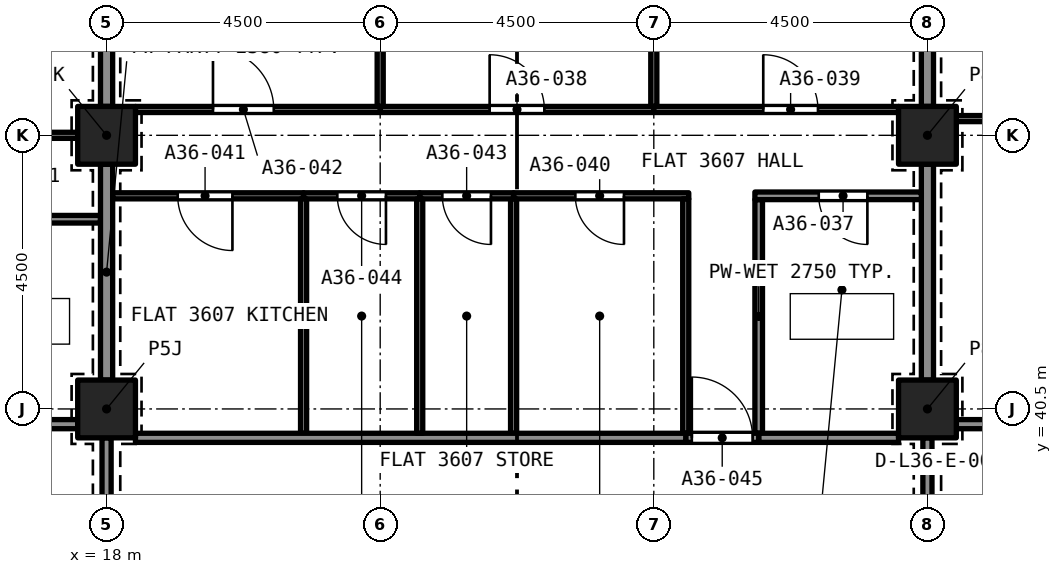
"""IFC4 building model, lengths in metres.
Left out: names, types, materials, properties, quantities, classifications, styles, units other than length and angle.
Written with IfcOpenShell. Run it as: python <this file> out.ifc"""

import sys

from ifc_helpers import new_model, si_unit, direction, frame, frame_2d, origin, origin_2d, place, context, subcontext, project, spatial, rectangle, extrude, element, fill, save


model = new_model("IFC4")
c1 = context("Model", 3, precision=1e-05, world=origin(), true_north=direction((0.0, 1.0)))
c2 = subcontext(c1, "Body", "Model", "MODEL_VIEW")
j1 = project(units=[si_unit("LENGTHUNIT", "METRE"), si_unit("PLANEANGLEUNIT", "RADIAN")], contexts=[c1])
p1 = place(None, origin())
s1 = spatial("IfcSite", under=j1, at=p1, CompositionType="ELEMENT")
p2 = place(p1, origin())
s2 = spatial("IfcBuilding", under=s1, at=p2, CompositionType="ELEMENT")
p3 = place(p2, frame((0.0, 0.0, 130.2)))
s3 = spatial("IfcBuildingStorey", under=s2, at=p3, CompositionType="ELEMENT", Elevation=130.2)
for number, where, z_axis, x_axis in (
    (1, (18.0, 40.5, 0.0), (0.0, 0.0, 1.0), (1.0, 0.0, 0.0)),
    (2, (31.5, 40.5, 0.0), (0.0, 0.0, 1.0), (1.0, 0.0, 0.0)),
    (3, (18.0, 45.0, 0.0), (0.0, 0.0, 1.0), (1.0, 0.0, 0.0)),
    (4, (31.5, 45.0, 0.0), (0.0, 0.0, 1.0), (1.0, 0.0, 0.0)),
):
    element("IfcColumn", number, at=place(p3, frame(where, z_axis=z_axis, x_axis=x_axis)), inside=s3, PredefinedType="COLUMN", context=c2, shape_type="SweptSolid", body=[
        extrude(rectangle(XDim=0.95, YDim=0.95, at=origin_2d()), origin(), (0.0, 0.0, 1.0), 3.2),
    ])
p4 = place(p3, frame((17.9, 43.62, 0.0), z_axis=(0.0, 0.0, 1.0), x_axis=(-1.0, 0.0, 0.0)))
e5 = element("IfcWall", 5, at=p4, inside=s3, PredefinedType="PARTITIONING", context=c2, shape_type="SweptSolid", body=[
    extrude(rectangle(XDim=2.781, YDim=0.125, at=frame_2d((1.39, 0.0))), origin(), (0.0, 0.0, 1.0), 2.9),
])
p5 = place(p4, frame((0.94, 0.0, 0.0)))
e6 = element("IfcOpeningElement", 6, at=p5, cuts=e5, PredefinedType="OPENING", context=c2, shape_type="SweptSolid", body=[
    extrude(rectangle(XDim=0.8, YDim=2.1, at=frame_2d((0.4, 1.05))), frame((0.0, 0.073, 0.0), z_axis=(0.0, -1.0, 0.0), x_axis=(1.0, 0.0, 0.0)), (0.0, 0.0, 1.0), 0.145),
])
p6 = place(p3, frame((18.0, 40.975, 0.0), z_axis=(0.0, 0.0, 1.0), x_axis=(0.0, 1.0, 0.0)))
e7 = element("IfcWall", 7, at=p6, inside=s3, PredefinedType="PARTITIONING", context=c2, shape_type="SweptSolid", body=[
    extrude(rectangle(XDim=3.55, YDim=0.2, at=frame_2d((1.775, 0.0))), origin(), (0.0, 0.0, 1.0), 2.38),
])
p7 = place(p3, frame((13.5, 45.0, 0.0), z_axis=(0.0, 0.0, 1.0), x_axis=(1.0, 0.0, 0.0)))
e8 = element("IfcWall", 8, at=p7, inside=s3, PredefinedType="PARTITIONING", context=c2, shape_type="SweptSolid", body=[
    extrude(rectangle(XDim=4.025, YDim=0.1, at=frame_2d((2.012, 0.0))), origin(), (0.0, 0.0, 1.0), 2.9),
])
p8 = place(p7, frame((1.8, 0.0, 0.0)))
e9 = element("IfcOpeningElement", 9, at=p8, cuts=e8, PredefinedType="OPENING", context=c2, shape_type="SweptSolid", body=[
    extrude(rectangle(XDim=0.9, YDim=2.1, at=frame_2d((0.45, 1.05))), frame((0.0, 0.06, 0.0), z_axis=(0.0, -1.0, 0.0), x_axis=(1.0, 0.0, 0.0)), (0.0, 0.0, 1.0), 0.12),
])
p9 = place(p3, frame((18.0, 45.475, 0.0), z_axis=(0.0, 0.0, 1.0), x_axis=(0.0, 1.0, 0.0)))
e10 = element("IfcWall", 10, at=p9, inside=s3, PredefinedType="PARTITIONING", context=c2, shape_type="SweptSolid", body=[
    extrude(rectangle(XDim=3.55, YDim=0.2, at=frame_2d((1.775, 0.0))), origin(), (0.0, 0.0, 1.0), 2.38),
])
p10 = place(p3, frame((13.25, 40.25, 0.0), z_axis=(0.0, 0.0, 1.0), x_axis=(1.0, 0.0, 0.0)))
e11 = element("IfcWall", 11, at=p10, inside=s3, PredefinedType="PARTITIONING", context=c2, shape_type="SweptSolid", body=[
    extrude(rectangle(XDim=4.275, YDim=0.15, at=frame_2d((2.137, 0.0))), origin(), (0.0, 0.0, 1.0), 2.9),
])
p11 = place(p3, frame((31.975, 45.275, 0.0), z_axis=(0.0, 0.0, 1.0), x_axis=(1.0, 0.0, 0.0)))
e12 = element("IfcWall", 12, at=p11, inside=s3, PredefinedType="PARTITIONING", context=c2, shape_type="SweptSolid", body=[
    extrude(rectangle(XDim=4.025, YDim=0.1, at=frame_2d((2.012, 0.0))), origin(), (0.0, 0.0, 1.0), 2.9),
])
p12 = place(p11, frame((1.275, 0.0, 0.0)))
e13 = element("IfcOpeningElement", 13, at=p12, cuts=e12, PredefinedType="OPENING", context=c2, shape_type="SweptSolid", body=[
    extrude(rectangle(XDim=1.0, YDim=2.1, at=frame_2d((0.5, 1.05))), frame((0.0, 0.06, 0.0), z_axis=(0.0, -1.0, 0.0), x_axis=(1.0, 0.0, 0.0)), (0.0, 0.0, 1.0), 0.12),
])
p13 = place(p3, frame((31.5, 40.975, 0.0), z_axis=(0.0, 0.0, 1.0), x_axis=(0.0, 1.0, 0.0)))
e14 = element("IfcWall", 14, at=p13, inside=s3, PredefinedType="PARTITIONING", context=c2, shape_type="SweptSolid", body=[
    extrude(rectangle(XDim=3.55, YDim=0.2, at=frame_2d((1.775, 0.0))), origin(), (0.0, 0.0, 1.0), 2.38),
])
p14 = place(p3, frame((31.975, 40.25, 0.0), z_axis=(0.0, 0.0, 1.0), x_axis=(1.0, 0.0, 0.0)))
e15 = element("IfcWall", 15, at=p14, inside=s3, PredefinedType="PARTITIONING", context=c2, shape_type="SweptSolid", body=[
    extrude(rectangle(XDim=2.375, YDim=0.15, at=frame_2d((1.188, 0.0))), origin(), (0.0, 0.0, 1.0), 2.9),
])
p15 = place(p14, frame((1.245, 0.0, 0.0)))
e16 = element("IfcOpeningElement", 16, at=p15, cuts=e15, PredefinedType="OPENING", context=c2, shape_type="SweptSolid", body=[
    extrude(rectangle(XDim=1.0, YDim=2.1, at=frame_2d((0.5, 1.05))), frame((0.0, 0.085, 0.0), z_axis=(0.0, -1.0, 0.0), x_axis=(1.0, 0.0, 0.0)), (0.0, 0.0, 1.0), 0.17),
])
p16 = place(p3, frame((31.5, 45.475, 0.0), z_axis=(0.0, 0.0, 1.0), x_axis=(0.0, 1.0, 0.0)))
e17 = element("IfcWall", 17, at=p16, inside=s3, PredefinedType="PARTITIONING", context=c2, shape_type="SweptSolid", body=[
    extrude(rectangle(XDim=3.55, YDim=0.2, at=frame_2d((1.775, 0.0))), origin(), (0.0, 0.0, 1.0), 2.38),
])
p17 = place(p3, frame((28.725, 40.1, 0.0), z_axis=(0.0, 0.0, 1.0), x_axis=(0.0, 1.0, 0.0)))
e18 = element("IfcWall", 18, at=p17, inside=s3, PredefinedType="PARTITIONING", context=c2, shape_type="SweptSolid", body=[
    extrude(rectangle(XDim=3.842, YDim=0.125, at=frame_2d((1.921, 0.0))), origin(), (0.0, 0.0, 1.0), 2.75),
])
p18 = place(p3, frame((31.4, 44.005, 0.0), z_axis=(0.0, 0.0, 1.0), x_axis=(-1.0, 0.0, 0.0)))
e19 = element("IfcWall", 19, at=p18, inside=s3, PredefinedType="PARTITIONING", context=c2, shape_type="SweptSolid", body=[
    extrude(rectangle(XDim=2.737, YDim=0.125, at=frame_2d((1.369, 0.0))), origin(), (0.0, 0.0, 1.0), 2.75),
])
p19 = place(p18, frame((0.887, 0.0, 0.0)))
e20 = element("IfcOpeningElement", 20, at=p19, cuts=e19, PredefinedType="OPENING", context=c2, shape_type="SweptSolid", body=[
    extrude(rectangle(XDim=0.8, YDim=2.1, at=frame_2d((0.4, 1.05))), frame((0.0, 0.073, 0.0), z_axis=(0.0, -1.0, 0.0), x_axis=(1.0, 0.0, 0.0)), (0.0, 0.0, 1.0), 0.145),
])
p20 = place(p3, frame((28.725, 40.025, 0.0), z_axis=(0.0, 0.0, 1.0), x_axis=(1.0, 0.0, 0.0)))
e21 = element("IfcWall", 21, at=p20, inside=s3, PredefinedType="PARTITIONING", context=c2, shape_type="SweptSolid", body=[
    extrude(rectangle(XDim=2.3, YDim=0.15, at=frame_2d((1.15, 0.0))), origin(), (0.0, 0.0, 1.0), 2.75),
])
p21 = place(p3, frame((27.0, 45.475, 0.0), z_axis=(0.0, 0.0, 1.0), x_axis=(0.0, 1.0, 0.0)))
e22 = element("IfcWall", 22, at=p21, inside=s3, PredefinedType="PARTITIONING", context=c2, shape_type="SweptSolid", body=[
    extrude(rectangle(XDim=3.55, YDim=0.1, at=frame_2d((1.775, 0.0))), origin(), (0.0, 0.0, 1.0), 2.75),
])
p22 = place(p3, frame((22.5, 45.425, 0.0), z_axis=(0.0, 0.0, 1.0), x_axis=(1.0, 0.0, 0.0)))
e23 = element("IfcWall", 23, at=p22, inside=s3, PredefinedType="PARTITIONING", context=c2, shape_type="SweptSolid", body=[
    extrude(rectangle(XDim=4.5, YDim=0.1, at=frame_2d((2.25, 0.0))), origin(), (0.0, 0.0, 1.0), 2.75),
])
p23 = place(p22, frame((1.8, 0.0, 0.0)))
e24 = element("IfcOpeningElement", 24, at=p23, cuts=e23, PredefinedType="OPENING", context=c2, shape_type="SweptSolid", body=[
    extrude(rectangle(XDim=0.9, YDim=2.1, at=frame_2d((0.45, 1.05))), frame((0.0, 0.06, 0.0), z_axis=(0.0, -1.0, 0.0), x_axis=(1.0, 0.0, 0.0)), (0.0, 0.0, 1.0), 0.12),
])
p24 = place(p3, frame((22.5, 45.475, 0.0), z_axis=(0.0, 0.0, 1.0), x_axis=(0.0, 1.0, 0.0)))
e25 = element("IfcWall", 25, at=p24, inside=s3, PredefinedType="PARTITIONING", context=c2, shape_type="SweptSolid", body=[
    extrude(rectangle(XDim=3.55, YDim=0.1, at=frame_2d((1.775, 0.0))), origin(), (0.0, 0.0, 1.0), 2.75),
])
p25 = place(p3, frame((27.0, 45.425, 0.0), z_axis=(0.0, 0.0, 1.0), x_axis=(1.0, 0.0, 0.0)))
e26 = element("IfcWall", 26, at=p25, inside=s3, PredefinedType="PARTITIONING", context=c2, shape_type="SweptSolid", body=[
    extrude(rectangle(XDim=4.025, YDim=0.1, at=frame_2d((2.012, 0.0))), origin(), (0.0, 0.0, 1.0), 2.75),
])
p26 = place(p25, frame((1.8, 0.0, 0.0)))
e27 = element("IfcOpeningElement", 27, at=p26, cuts=e26, PredefinedType="OPENING", context=c2, shape_type="SweptSolid", body=[
    extrude(rectangle(XDim=0.9, YDim=2.1, at=frame_2d((0.45, 1.05))), frame((0.0, 0.06, 0.0), z_axis=(0.0, -1.0, 0.0), x_axis=(1.0, 0.0, 0.0)), (0.0, 0.0, 1.0), 0.12),
])
p27 = place(p3, frame((27.575, 44.005, 0.0), z_axis=(0.0, 0.0, 1.0), x_axis=(-1.0, 0.0, 0.0)))
e28 = element("IfcWall", 28, at=p27, inside=s3, PredefinedType="PARTITIONING", context=c2, shape_type="SweptSolid", body=[
    extrude(rectangle(XDim=2.881, YDim=0.1, at=frame_2d((1.44, 0.0))), origin(), (0.0, 0.0, 1.0), 2.75),
])
p28 = place(p27, frame((1.066, 0.0, 0.0)))
e29 = element("IfcOpeningElement", 29, at=p28, cuts=e28, PredefinedType="OPENING", context=c2, shape_type="SweptSolid", body=[
    extrude(rectangle(XDim=0.8, YDim=2.1, at=frame_2d((0.4, 1.05))), frame((0.0, 0.06, 0.0), z_axis=(0.0, -1.0, 0.0), x_axis=(1.0, 0.0, 0.0)), (0.0, 0.0, 1.0), 0.12),
])
for number, where, z_axis, x_axis in (
    (30, (27.525, 40.1, 0.0), (0.0, 0.0, 1.0), (0.0, 1.0, 0.0)),
    (31, (24.694, 40.1, 0.0), (0.0, 0.0, 1.0), (0.0, 1.0, 0.0)),
):
    element("IfcWall", number, at=place(p3, frame(where, z_axis=z_axis, x_axis=x_axis)), inside=s3, PredefinedType="PARTITIONING", context=c2, shape_type="SweptSolid", body=[
        extrude(rectangle(XDim=3.855, YDim=0.1, at=frame_2d((1.927, 0.0))), origin(), (0.0, 0.0, 1.0), 2.75),
    ])
p29 = place(p3, frame((21.24, 44.005, 0.0), z_axis=(0.0, 0.0, 1.0), x_axis=(-1.0, 0.0, 0.0)))
e32 = element("IfcWall", 32, at=p29, inside=s3, PredefinedType="PARTITIONING", context=c2, shape_type="SweptSolid", body=[
    extrude(rectangle(XDim=3.14, YDim=0.1, at=frame_2d((1.57, 0.0))), origin(), (0.0, 0.0, 1.0), 2.75),
])
p30 = place(p29, frame((1.17, 0.0, 0.0)))
e33 = element("IfcOpeningElement", 33, at=p30, cuts=e32, PredefinedType="OPENING", context=c2, shape_type="SweptSolid", body=[
    extrude(rectangle(XDim=0.9, YDim=2.1, at=frame_2d((0.45, 1.05))), frame((0.0, 0.06, 0.0), z_axis=(0.0, -1.0, 0.0), x_axis=(1.0, 0.0, 0.0)), (0.0, 0.0, 1.0), 0.12),
])
p31 = place(p3, frame((18.475, 45.425, 0.0), z_axis=(0.0, 0.0, 1.0), x_axis=(1.0, 0.0, 0.0)))
e34 = element("IfcWall", 34, at=p31, inside=s3, PredefinedType="PARTITIONING", context=c2, shape_type="SweptSolid", body=[
    extrude(rectangle(XDim=4.025, YDim=0.1, at=frame_2d((2.012, 0.0))), origin(), (0.0, 0.0, 1.0), 2.75),
])
p32 = place(p31, frame((1.275, 0.0, 0.0)))
e35 = element("IfcOpeningElement", 35, at=p32, cuts=e34, PredefinedType="OPENING", context=c2, shape_type="SweptSolid", body=[
    extrude(rectangle(XDim=1.0, YDim=2.1, at=frame_2d((0.5, 1.05))), frame((0.0, 0.06, 0.0), z_axis=(0.0, -1.0, 0.0), x_axis=(1.0, 0.0, 0.0)), (0.0, 0.0, 1.0), 0.12),
])
p33 = place(p3, frame((24.694, 44.005, 0.0), z_axis=(0.0, 0.0, 1.0), x_axis=(-1.0, 0.0, 0.0)))
e36 = element("IfcWall", 36, at=p33, inside=s3, PredefinedType="PARTITIONING", context=c2, shape_type="SweptSolid", body=[
    extrude(rectangle(XDim=1.544, YDim=0.1, at=frame_2d((0.772, 0.0))), origin(), (0.0, 0.0, 1.0), 2.75),
])
p34 = place(p33, frame((0.372, 0.0, 0.0)))
e37 = element("IfcOpeningElement", 37, at=p34, cuts=e36, PredefinedType="OPENING", context=c2, shape_type="SweptSolid", body=[
    extrude(rectangle(XDim=0.8, YDim=2.1, at=frame_2d((0.4, 1.05))), frame((0.0, 0.06, 0.0), z_axis=(0.0, -1.0, 0.0), x_axis=(1.0, 0.0, 0.0)), (0.0, 0.0, 1.0), 0.12),
])
p35 = place(p3, frame((23.15, 44.005, 0.0), z_axis=(0.0, 0.0, 1.0), x_axis=(-1.0, 0.0, 0.0)))
e38 = element("IfcWall", 38, at=p35, inside=s3, PredefinedType="PARTITIONING", context=c2, shape_type="SweptSolid", body=[
    extrude(rectangle(XDim=1.91, YDim=0.1, at=frame_2d((0.955, 0.0))), origin(), (0.0, 0.0, 1.0), 2.75),
])
p36 = place(p35, frame((0.555, 0.0, 0.0)))
e39 = element("IfcOpeningElement", 39, at=p36, cuts=e38, PredefinedType="OPENING", context=c2, shape_type="SweptSolid", body=[
    extrude(rectangle(XDim=0.8, YDim=2.1, at=frame_2d((0.4, 1.05))), frame((0.0, 0.06, 0.0), z_axis=(0.0, -1.0, 0.0), x_axis=(1.0, 0.0, 0.0)), (0.0, 0.0, 1.0), 0.12),
])
p37 = place(p3, frame((27.525, 40.025, 0.0), z_axis=(0.0, 0.0, 1.0), x_axis=(1.0, 0.0, 0.0)))
e40 = element("IfcWall", 40, at=p37, inside=s3, PredefinedType="PARTITIONING", context=c2, shape_type="SweptSolid", body=[
    extrude(rectangle(XDim=1.2, YDim=0.15, at=frame_2d((0.6, 0.0))), origin(), (0.0, 0.0, 1.0), 2.75),
])
p38 = place(p37, frame((0.1, 0.0, 0.0)))
e41 = element("IfcOpeningElement", 41, at=p38, cuts=e40, PredefinedType="OPENING", context=c2, shape_type="SweptSolid", body=[
    extrude(rectangle(XDim=1.0, YDim=2.1, at=frame_2d((0.5, 1.05))), frame((0.0, 0.085, 0.0), z_axis=(0.0, -1.0, 0.0), x_axis=(1.0, 0.0, 0.0)), (0.0, 0.0, 1.0), 0.17),
])
p39 = place(p3, frame((21.24, 40.1, 0.0), z_axis=(0.0, 0.0, 1.0), x_axis=(0.0, 1.0, 0.0)))
e42 = element("IfcWall", 42, at=p39, inside=s3, PredefinedType="PARTITIONING", context=c2, shape_type="SweptSolid", body=[
    extrude(rectangle(XDim=3.855, YDim=0.1, at=frame_2d((1.927, 0.0))), origin(), (0.0, 0.0, 1.0), 2.75),
])
p40 = place(p3, frame((18.475, 40.025, 0.0), z_axis=(0.0, 0.0, 1.0), x_axis=(1.0, 0.0, 0.0)))
e43 = element("IfcWall", 43, at=p40, inside=s3, PredefinedType="PARTITIONING", context=c2, shape_type="SweptSolid", body=[
    extrude(rectangle(XDim=9.05, YDim=0.15, at=frame_2d((4.525, 0.0))), origin(), (0.0, 0.0, 1.0), 2.75),
])
p41 = place(p3, frame((23.15, 40.1, 0.0), z_axis=(0.0, 0.0, 1.0), x_axis=(0.0, 1.0, 0.0)))
e44 = element("IfcWall", 44, at=p41, inside=s3, PredefinedType="PARTITIONING", context=c2, shape_type="SweptSolid", body=[
    extrude(rectangle(XDim=3.855, YDim=0.1, at=frame_2d((1.927, 0.0))), origin(), (0.0, 0.0, 1.0), 2.75),
])
p42 = place(p3, frame((31.5, 36.475, 0.0), z_axis=(0.0, 0.0, 1.0), x_axis=(0.0, 1.0, 0.0)))
e45 = element("IfcWall", 45, at=p42, inside=s3, PredefinedType="PARTITIONING", context=c2, shape_type="SweptSolid", body=[
    extrude(rectangle(XDim=3.55, YDim=0.15, at=frame_2d((1.775, 0.0))), origin(), (0.0, 0.0, 1.0), 2.38),
])
p43 = place(p42, frame((1.175, 0.0, 0.0)))
e46 = element("IfcOpeningElement", 46, at=p43, cuts=e45, PredefinedType="OPENING", context=c2, shape_type="SweptSolid", body=[
    extrude(rectangle(XDim=1.2, YDim=2.1, at=frame_2d((0.6, 1.05))), frame((0.0, 0.085, 0.0), z_axis=(0.0, -1.0, 0.0), x_axis=(1.0, 0.0, 0.0)), (0.0, 0.0, 1.0), 0.17),
])
p44 = place(p3, frame((18.0, 40.025, 0.0), z_axis=(0.0, 0.0, 1.0), x_axis=(0.0, -1.0, 0.0)))
e47 = element("IfcWall", 47, at=p44, inside=s3, PredefinedType="PARTITIONING", context=c2, shape_type="SweptSolid", body=[
    extrude(rectangle(XDim=3.55, YDim=0.15, at=frame_2d((1.775, 0.0))), origin(), (0.0, 0.0, 1.0), 2.38),
])
p45 = place(p44, frame((1.175, 0.0, 0.0)))
e48 = element("IfcOpeningElement", 48, at=p45, cuts=e47, PredefinedType="OPENING", context=c2, shape_type="SweptSolid", body=[
    extrude(rectangle(XDim=1.2, YDim=2.1, at=frame_2d((0.6, 1.05))), frame((0.0, 0.085, 0.0), z_axis=(0.0, -1.0, 0.0), x_axis=(1.0, 0.0, 0.0)), (0.0, 0.0, 1.0), 0.17),
])
p46 = place(p19, origin())
e49 = element("IfcDoor", 49, at=p46, inside=s3, OperationType="SINGLE_SWING_LEFT", PredefinedType="DOOR", context=c2, shape_type="SweptSolid", body=[
    extrude(rectangle(XDim=0.8, YDim=2.1, at=frame_2d((0.4, 1.05))), frame((0.0, 0.025, 0.0), z_axis=(0.0, -1.0, 0.0), x_axis=(1.0, 0.0, 0.0)), (0.0, 0.0, 1.0), 0.05),
])
fill(e20, e49)
p47 = place(p23, origin())
e50 = element("IfcDoor", 50, at=p47, inside=s3, OperationType="SINGLE_SWING_LEFT", PredefinedType="DOOR", context=c2, shape_type="SweptSolid", body=[
    extrude(rectangle(XDim=0.9, YDim=2.1, at=frame_2d((0.45, 1.05))), frame((0.0, 0.025, 0.0), z_axis=(0.0, -1.0, 0.0), x_axis=(1.0, 0.0, 0.0)), (0.0, 0.0, 1.0), 0.05),
])
fill(e24, e50)
p48 = place(p26, origin())
e51 = element("IfcDoor", 51, at=p48, inside=s3, OperationType="SINGLE_SWING_RIGHT", PredefinedType="DOOR", context=c2, shape_type="SweptSolid", body=[
    extrude(rectangle(XDim=0.9, YDim=2.1, at=frame_2d((0.45, 1.05))), frame((0.0, 0.025, 0.0), z_axis=(0.0, -1.0, 0.0), x_axis=(1.0, 0.0, 0.0)), (0.0, 0.0, 1.0), 0.05),
])
fill(e27, e51)
p49 = place(p28, origin())
e52 = element("IfcDoor", 52, at=p49, inside=s3, OperationType="SINGLE_SWING_RIGHT", PredefinedType="DOOR", context=c2, shape_type="SweptSolid", body=[
    extrude(rectangle(XDim=0.8, YDim=2.1, at=frame_2d((0.4, 1.05))), frame((0.0, 0.025, 0.0), z_axis=(0.0, -1.0, 0.0), x_axis=(1.0, 0.0, 0.0)), (0.0, 0.0, 1.0), 0.05),
])
fill(e29, e52)
p50 = place(p30, origin())
e53 = element("IfcDoor", 53, at=p50, inside=s3, OperationType="SINGLE_SWING_RIGHT", PredefinedType="DOOR", context=c2, shape_type="SweptSolid", body=[
    extrude(rectangle(XDim=0.9, YDim=2.1, at=frame_2d((0.45, 1.05))), frame((0.0, 0.025, 0.0), z_axis=(0.0, -1.0, 0.0), x_axis=(1.0, 0.0, 0.0)), (0.0, 0.0, 1.0), 0.05),
])
fill(e33, e53)
p51 = place(p32, origin())
e54 = element("IfcDoor", 54, at=p51, inside=s3, OperationType="SINGLE_SWING_LEFT", PredefinedType="DOOR", context=c2, shape_type="SweptSolid", body=[
    extrude(rectangle(XDim=1.0, YDim=2.1, at=frame_2d((0.5, 1.05))), frame((0.0, 0.025, 0.0), z_axis=(0.0, -1.0, 0.0), x_axis=(1.0, 0.0, 0.0)), (0.0, 0.0, 1.0), 0.05),
])
fill(e35, e54)
p52 = place(p34, origin())
e55 = element("IfcDoor", 55, at=p52, inside=s3, OperationType="SINGLE_SWING_LEFT", PredefinedType="DOOR", context=c2, shape_type="SweptSolid", body=[
    extrude(rectangle(XDim=0.8, YDim=2.1, at=frame_2d((0.4, 1.05))), frame((0.0, 0.025, 0.0), z_axis=(0.0, -1.0, 0.0), x_axis=(1.0, 0.0, 0.0)), (0.0, 0.0, 1.0), 0.05),
])
fill(e37, e55)
p53 = place(p36, origin())
e56 = element("IfcDoor", 56, at=p53, inside=s3, OperationType="SINGLE_SWING_LEFT", PredefinedType="DOOR", context=c2, shape_type="SweptSolid", body=[
    extrude(rectangle(XDim=0.8, YDim=2.1, at=frame_2d((0.4, 1.05))), frame((0.0, 0.025, 0.0), z_axis=(0.0, -1.0, 0.0), x_axis=(1.0, 0.0, 0.0)), (0.0, 0.0, 1.0), 0.05),
])
fill(e39, e56)
p54 = place(p38, origin())
e57 = element("IfcDoor", 57, at=p54, inside=s3, OperationType="SINGLE_SWING_RIGHT", PredefinedType="DOOR", context=c2, shape_type="SweptSolid", body=[
    extrude(rectangle(XDim=1.0, YDim=2.1, at=frame_2d((0.5, 1.05))), frame((0.0, 0.025, 0.0), z_axis=(0.0, -1.0, 0.0), x_axis=(1.0, 0.0, 0.0)), (0.0, 0.0, 1.0), 0.05),
])
fill(e41, e57)
save(model, sys.argv[1])
